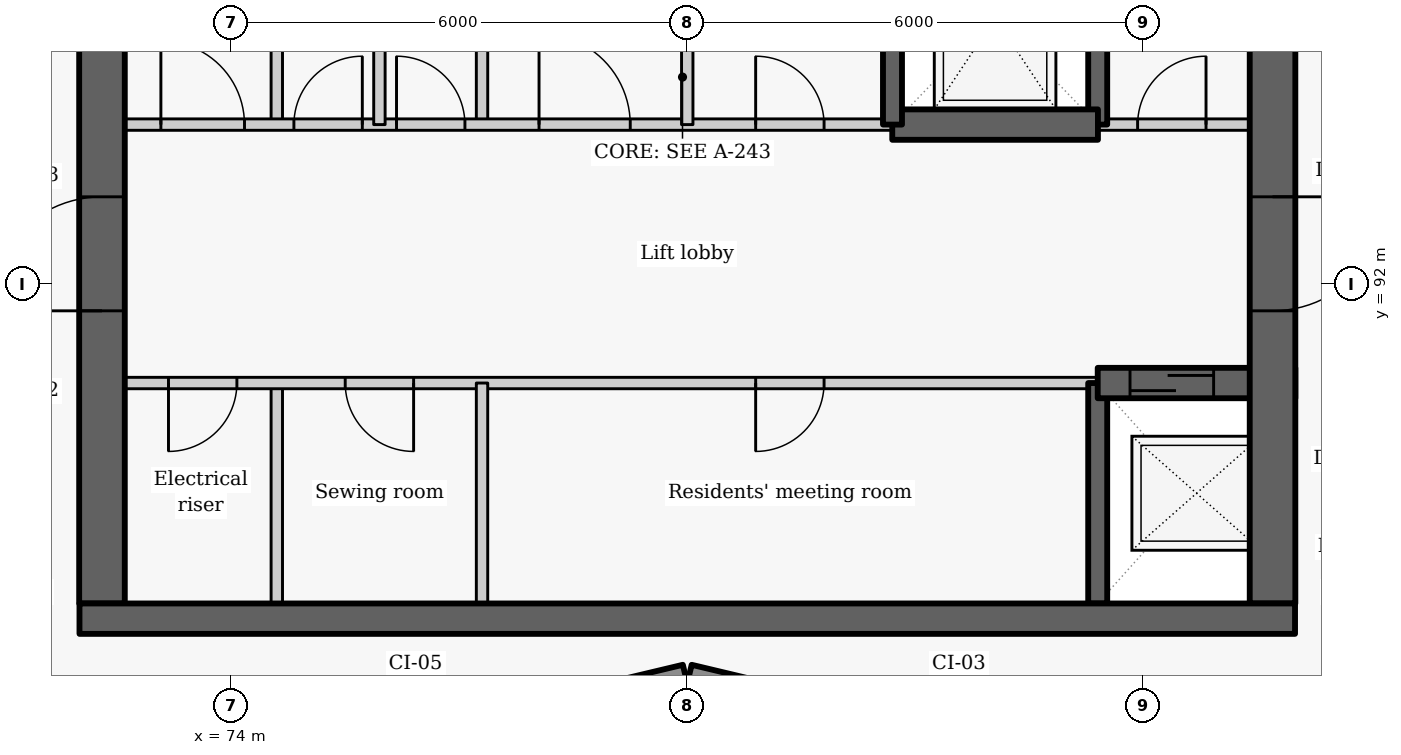
"""IFC4 building model, lengths in metres.
Left out: names, types, materials, properties, quantities, classifications, styles, units other than length and angle.
Written with IfcOpenShell. Run it as: python <this file> out.ifc"""

import sys

from ifc_helpers import new_model, si_unit, direction, frame, frame_2d, origin, place, context, subcontext, project, spatial, rectangle, extrude, element, fill, save


model = new_model("IFC4")
c1 = context("Model", 3, precision=1e-05, world=origin(), true_north=direction((0.0, 1.0)))
c2 = subcontext(c1, "Body", "Model", "MODEL_VIEW")
j1 = project(units=[si_unit("LENGTHUNIT", "METRE"), si_unit("PLANEANGLEUNIT", "RADIAN")], contexts=[c1])
p1 = place(None, origin())
s1 = spatial("IfcSite", under=j1, at=p1, CompositionType="ELEMENT")
p2 = place(p1, origin())
s2 = spatial("IfcBuilding", under=s1, at=p2, CompositionType="ELEMENT")
p3 = place(p2, frame((0.0, 0.0, 259.2)))
s3 = spatial("IfcBuildingStorey", under=s2, at=p3, CompositionType="ELEMENT", Elevation=259.2)
for number, where, z_axis, x_axis in (
    (1, (76.814, 86.119, 0.0), (0.0, 0.0, 1.0), (0.973, 0.232, 0.0)),
    (2, (80.029, 86.872, 0.0), (0.0, 0.0, 1.0), (0.973, -0.232, 0.0)),
):
    element("IfcWall", number, at=place(p3, frame(where, z_axis=z_axis, x_axis=x_axis)), inside=s3, PredefinedType="SOLIDWALL", context=c2, shape_type="SweptSolid", body=[
        extrude(rectangle(XDim=3.246, YDim=0.25, at=frame_2d((1.623, 0.0))), origin(), (0.0, 0.0, 1.0), 2.425),
    ])
p4 = place(p3, frame((74.6, 87.8, 0.0), z_axis=(0.0, 0.0, 1.0), x_axis=(0.0, 1.0, 0.0)))
e3 = element("IfcWall", 3, at=p4, inside=s3, PredefinedType="PARTITIONING", context=c2, shape_type="SweptSolid", body=[
    extrude(rectangle(XDim=2.9, YDim=0.15, at=frame_2d((1.45, 0.0))), origin(), (0.0, 0.0, 1.0), 3.025),
])
p5 = place(p3, frame((74.6, 94.1, 0.0), z_axis=(0.0, 0.0, 1.0), x_axis=(0.0, 1.0, 0.0)))
e4 = element("IfcWall", 4, at=p5, inside=s3, PredefinedType="PARTITIONING", context=c2, shape_type="SweptSolid", body=[
    extrude(rectangle(XDim=2.8, YDim=0.15, at=frame_2d((1.4, 0.0))), origin(), (0.0, 0.0, 1.0), 3.025),
])
p6 = place(p3, frame((85.4, 90.7, 0.0), z_axis=(0.0, 0.0, 1.0), x_axis=(-1.0, 0.0, 0.0)))
e5 = element("IfcWall", 5, at=p6, inside=s3, PredefinedType="PARTITIONING", context=c2, shape_type="SweptSolid", body=[
    extrude(rectangle(XDim=13.4, YDim=0.15, at=frame_2d((6.7, 0.0))), origin(), (0.0, 0.0, 1.0), 3.025),
])
p7 = place(p6, frame((11.325, 0.0, 0.0)))
e6 = element("IfcOpeningElement", 6, at=p7, cuts=e5, PredefinedType="OPENING", context=c2, shape_type="SweptSolid", body=[
    extrude(rectangle(XDim=0.9, YDim=2.1, at=frame_2d((0.45, 1.05))), frame((0.0, 0.085, 0.0), z_axis=(0.0, -1.0, 0.0), x_axis=(1.0, 0.0, 0.0)), (0.0, 0.0, 1.0), 0.17),
])
p8 = place(p6, frame((9.0, 0.0, 0.0)))
e7 = element("IfcOpeningElement", 7, at=p8, cuts=e5, PredefinedType="OPENING", context=c2, shape_type="SweptSolid", body=[
    extrude(rectangle(XDim=0.9, YDim=2.1, at=frame_2d((0.45, 1.05))), frame((0.0, 0.085, 0.0), z_axis=(0.0, -1.0, 0.0), x_axis=(1.0, 0.0, 0.0)), (0.0, 0.0, 1.0), 0.17),
])
p9 = place(p6, frame((3.6, 0.0, 0.0)))
e8 = element("IfcOpeningElement", 8, at=p9, cuts=e5, PredefinedType="OPENING", context=c2, shape_type="SweptSolid", body=[
    extrude(rectangle(XDim=0.9, YDim=2.1, at=frame_2d((0.45, 1.05))), frame((0.0, 0.085, 0.0), z_axis=(0.0, -1.0, 0.0), x_axis=(1.0, 0.0, 0.0)), (0.0, 0.0, 1.0), 0.17),
])
p10 = place(p3, frame((72.3, 87.8, -0.275), z_axis=(0.0, 0.0, 1.0), x_axis=(0.0, 1.0, 0.0)))
e9 = element("IfcWall", 9, at=p10, inside=s3, PredefinedType="SHEAR", context=c2, shape_type="SweptSolid", body=[
    extrude(rectangle(XDim=9.1, YDim=0.6, at=frame_2d((4.55, 0.0))), origin(), (0.0, 0.0, 1.0), 3.3),
])
p11 = place(p10, frame((3.85, 0.0, 0.275)))
e10 = element("IfcOpeningElement", 10, at=p11, cuts=e9, PredefinedType="OPENING", context=c2, shape_type="SweptSolid", body=[
    extrude(rectangle(XDim=1.5, YDim=2.1, at=frame_2d((0.75, 1.05))), frame((0.0, 0.31, 0.0), z_axis=(0.0, -1.0, 0.0), x_axis=(1.0, 0.0, 0.0)), (0.0, 0.0, 1.0), 0.62),
])
p12 = place(p3, frame((85.4, 87.8, -0.275), z_axis=(0.0, 0.0, 1.0), x_axis=(0.0, 1.0, 0.0)))
e11 = element("IfcWall", 11, at=p12, inside=s3, PredefinedType="SHEAR", context=c2, shape_type="SweptSolid", body=[
    extrude(rectangle(XDim=2.9, YDim=0.25, at=frame_2d((1.45, 0.0))), origin(), (0.0, 0.0, 1.0), 3.3),
])
p13 = place(p3, frame((85.4, 94.1, -0.275), z_axis=(0.0, 0.0, 1.0), x_axis=(0.0, 1.0, 0.0)))
e12 = element("IfcWall", 12, at=p13, inside=s3, PredefinedType="SHEAR", context=c2, shape_type="SweptSolid", body=[
    extrude(rectangle(XDim=2.8, YDim=0.25, at=frame_2d((1.4, 0.0))), origin(), (0.0, 0.0, 1.0), 3.3),
])
p14 = place(p3, frame((85.4, 90.7, -0.275), z_axis=(0.0, 0.0, 1.0), x_axis=(1.0, 0.0, 0.0)))
e13 = element("IfcWall", 13, at=p14, inside=s3, PredefinedType="SHEAR", context=c2, shape_type="SweptSolid", body=[
    extrude(rectangle(XDim=2.6, YDim=0.4, at=frame_2d((1.3, 0.0))), origin(), (0.0, 0.0, 1.0), 3.3),
])
p15 = place(p14, frame((0.425, 0.0, 0.275)))
e14 = element("IfcOpeningElement", 14, at=p15, cuts=e13, PredefinedType="OPENING", context=c2, shape_type="SweptSolid", body=[
    extrude(rectangle(XDim=1.1, YDim=2.1, at=frame_2d((0.55, 1.05))), frame((0.0, 0.21, 0.0), z_axis=(0.0, -1.0, 0.0), x_axis=(1.0, 0.0, 0.0)), (0.0, 0.0, 1.0), 0.42),
])
p16 = place(p3, frame((87.7, 102.05, -0.275), z_axis=(0.0, 0.0, 1.0), x_axis=(0.0, -1.0, 0.0)))
e15 = element("IfcWall", 15, at=p16, inside=s3, PredefinedType="SHEAR", context=c2, shape_type="SweptSolid", body=[
    extrude(rectangle(XDim=14.25, YDim=0.6, at=frame_2d((7.125, 0.0))), origin(), (0.0, 0.0, 1.0), 3.3),
])
p17 = place(p16, frame((8.9, 0.0, 0.275)))
e16 = element("IfcOpeningElement", 16, at=p17, cuts=e15, PredefinedType="OPENING", context=c2, shape_type="SweptSolid", body=[
    extrude(rectangle(XDim=1.5, YDim=2.1, at=frame_2d((0.75, 1.05))), frame((0.0, 0.31, 0.0), z_axis=(0.0, -1.0, 0.0), x_axis=(1.0, 0.0, 0.0)), (0.0, 0.0, 1.0), 0.62),
])
p18 = place(p16, frame((2.025, 0.0, 0.275)))
e17 = element("IfcOpeningElement", 17, at=p18, cuts=e15, PredefinedType="OPENING", context=c2, shape_type="SweptSolid", body=[
    extrude(rectangle(XDim=1.1, YDim=2.1, at=frame_2d((0.55, 1.05))), frame((0.0, 0.31, 0.0), z_axis=(0.0, -1.0, 0.0), x_axis=(1.0, 0.0, 0.0)), (0.0, 0.0, 1.0), 0.62),
])
p19 = place(p3, frame((77.3, 87.8, 0.0), z_axis=(0.0, 0.0, 1.0), x_axis=(0.0, 1.0, 0.0)))
e18 = element("IfcWall", 18, at=p19, inside=s3, PredefinedType="PARTITIONING", context=c2, shape_type="SweptSolid", body=[
    extrude(rectangle(XDim=2.9, YDim=0.15, at=frame_2d((1.45, 0.0))), origin(), (0.0, 0.0, 1.0), 3.025),
])
p20 = place(p3, frame((77.3, 94.1, 0.0), z_axis=(0.0, 0.0, 1.0), x_axis=(0.0, 1.0, 0.0)))
e19 = element("IfcWall", 19, at=p20, inside=s3, PredefinedType="PARTITIONING", context=c2, shape_type="SweptSolid", body=[
    extrude(rectangle(XDim=2.8, YDim=0.15, at=frame_2d((1.4, 0.0))), origin(), (0.0, 0.0, 1.0), 3.025),
])
p21 = place(p3, frame((72.0, 94.1, 0.0), z_axis=(0.0, 0.0, 1.0), x_axis=(1.0, 0.0, 0.0)))
e20 = element("IfcWall", 20, at=p21, inside=s3, PredefinedType="PARTITIONING", context=c2, shape_type="SweptSolid", body=[
    extrude(rectangle(XDim=10.703, YDim=0.15, at=frame_2d((5.352, 0.0))), origin(), (0.0, 0.0, 1.0), 3.025),
])
p22 = place(p21, frame((1.075, 0.0, 0.0)))
e21 = element("IfcOpeningElement", 21, at=p22, cuts=e20, PredefinedType="OPENING", context=c2, shape_type="SweptSolid", body=[
    extrude(rectangle(XDim=1.1, YDim=2.1, at=frame_2d((0.55, 1.05))), frame((0.0, 0.085, 0.0), z_axis=(0.0, -1.0, 0.0), x_axis=(1.0, 0.0, 0.0)), (0.0, 0.0, 1.0), 0.17),
])
p23 = place(p21, frame((2.825, 0.0, 0.0)))
e22 = element("IfcOpeningElement", 22, at=p23, cuts=e20, PredefinedType="OPENING", context=c2, shape_type="SweptSolid", body=[
    extrude(rectangle(XDim=0.9, YDim=2.1, at=frame_2d((0.45, 1.05))), frame((0.0, 0.085, 0.0), z_axis=(0.0, -1.0, 0.0), x_axis=(1.0, 0.0, 0.0)), (0.0, 0.0, 1.0), 0.17),
])
p24 = place(p21, frame((4.175, 0.0, 0.0)))
e23 = element("IfcOpeningElement", 23, at=p24, cuts=e20, PredefinedType="OPENING", context=c2, shape_type="SweptSolid", body=[
    extrude(rectangle(XDim=0.9, YDim=2.1, at=frame_2d((0.45, 1.05))), frame((0.0, 0.085, 0.0), z_axis=(0.0, -1.0, 0.0), x_axis=(1.0, 0.0, 0.0)), (0.0, 0.0, 1.0), 0.17),
])
p25 = place(p21, frame((6.05, 0.0, 0.0)))
e24 = element("IfcOpeningElement", 24, at=p25, cuts=e20, PredefinedType="OPENING", context=c2, shape_type="SweptSolid", body=[
    extrude(rectangle(XDim=1.2, YDim=2.1, at=frame_2d((0.6, 1.05))), frame((0.0, 0.085, 0.0), z_axis=(0.0, -1.0, 0.0), x_axis=(1.0, 0.0, 0.0)), (0.0, 0.0, 1.0), 0.17),
])
p26 = place(p21, frame((8.9, 0.0, 0.0)))
e25 = element("IfcOpeningElement", 25, at=p26, cuts=e20, PredefinedType="OPENING", context=c2, shape_type="SweptSolid", body=[
    extrude(rectangle(XDim=0.9, YDim=2.1, at=frame_2d((0.45, 1.05))), frame((0.0, 0.085, 0.0), z_axis=(0.0, -1.0, 0.0), x_axis=(1.0, 0.0, 0.0)), (0.0, 0.0, 1.0), 0.17),
])
p27 = place(p3, frame((85.397, 94.1, 0.0), z_axis=(0.0, 0.0, 1.0), x_axis=(1.0, 0.0, 0.0)))
e26 = element("IfcWall", 26, at=p27, inside=s3, PredefinedType="PARTITIONING", context=c2, shape_type="SweptSolid", body=[
    extrude(rectangle(XDim=2.603, YDim=0.15, at=frame_2d((1.302, 0.0))), origin(), (0.0, 0.0, 1.0), 3.025),
])
p28 = place(p27, frame((0.528, 0.0, 0.0)))
e27 = element("IfcOpeningElement", 27, at=p28, cuts=e26, PredefinedType="OPENING", context=c2, shape_type="SweptSolid", body=[
    extrude(rectangle(XDim=0.9, YDim=2.1, at=frame_2d((0.45, 1.05))), frame((0.0, 0.085, 0.0), z_axis=(0.0, -1.0, 0.0), x_axis=(1.0, 0.0, 0.0)), (0.0, 0.0, 1.0), 0.17),
])
p29 = place(p3, frame((82.697, 94.1, -0.275), z_axis=(0.0, 0.0, 1.0), x_axis=(1.0, 0.0, 0.0)))
e28 = element("IfcWall", 28, at=p29, inside=s3, PredefinedType="SHEAR", context=c2, shape_type="SweptSolid", body=[
    extrude(rectangle(XDim=2.706, YDim=0.4, at=frame_2d((1.353, 0.0))), origin(), (0.0, 0.0, 1.0), 3.3),
])
for number, where, z_axis, x_axis in (
    (29, (75.95, 94.1, 0.0), (0.0, 0.0, 1.0), (0.0, 1.0, 0.0)),
    (30, (80.0, 94.1, 0.0), (0.0, 0.0, 1.0), (0.0, 1.0, 0.0)),
):
    element("IfcWall", number, at=place(p3, frame(where, z_axis=z_axis, x_axis=x_axis)), inside=s3, PredefinedType="PARTITIONING", context=c2, shape_type="SweptSolid", body=[
        extrude(rectangle(XDim=2.8, YDim=0.15, at=frame_2d((1.4, 0.0))), origin(), (0.0, 0.0, 1.0), 3.025),
    ])
p30 = place(p3, frame((82.7, 94.1, -0.275), z_axis=(0.0, 0.0, 1.0), x_axis=(0.0, 1.0, 0.0)))
e31 = element("IfcWall", 31, at=p30, inside=s3, PredefinedType="SHEAR", context=c2, shape_type="SweptSolid", body=[
    extrude(rectangle(XDim=2.8, YDim=0.25, at=frame_2d((1.4, 0.0))), origin(), (0.0, 0.0, 1.0), 3.3),
])
p31 = place(p3, frame((72.004, 87.6, -0.275), z_axis=(0.0, 0.0, 1.0), x_axis=(1.0, 0.0, 0.0)))
e32 = element("IfcWall", 32, at=p31, inside=s3, PredefinedType="SHEAR", context=c2, shape_type="SweptSolid", body=[
    extrude(rectangle(XDim=15.992, YDim=0.4, at=frame_2d((7.996, 0.0))), origin(), (0.0, 0.0, 1.0), 3.3),
])
p32 = place(p7, origin())
e33 = element("IfcDoor", 33, at=p32, inside=s3, OperationType="SINGLE_SWING_RIGHT", PredefinedType="DOOR", context=c2, shape_type="SweptSolid", body=[
    extrude(rectangle(XDim=0.9, YDim=2.1, at=frame_2d((0.45, 1.05))), frame((0.0, 0.025, 0.0), z_axis=(0.0, -1.0, 0.0), x_axis=(1.0, 0.0, 0.0)), (0.0, 0.0, 1.0), 0.05),
])
fill(e6, e33)
p33 = place(p15, origin())
e34 = element("IfcDoor", 34, at=p33, inside=s3, OperationType="SLIDING_TO_LEFT", PredefinedType="DOOR", context=c2, shape_type="SweptSolid", body=[
    extrude(rectangle(XDim=1.1, YDim=2.1, at=frame_2d((0.55, 1.05))), frame((0.0, 0.025, 0.0), z_axis=(0.0, -1.0, 0.0), x_axis=(1.0, 0.0, 0.0)), (0.0, 0.0, 1.0), 0.05),
])
fill(e14, e34)
p34 = place(p8, origin())
e35 = element("IfcDoor", 35, at=p34, inside=s3, OperationType="SINGLE_SWING_LEFT", PredefinedType="DOOR", context=c2, shape_type="SweptSolid", body=[
    extrude(rectangle(XDim=0.9, YDim=2.1, at=frame_2d((0.45, 1.05))), frame((0.0, 0.025, 0.0), z_axis=(0.0, -1.0, 0.0), x_axis=(1.0, 0.0, 0.0)), (0.0, 0.0, 1.0), 0.05),
])
fill(e7, e35)
p35 = place(p9, origin())
e36 = element("IfcDoor", 36, at=p35, inside=s3, OperationType="SINGLE_SWING_RIGHT", PredefinedType="DOOR", context=c2, shape_type="SweptSolid", body=[
    extrude(rectangle(XDim=0.9, YDim=2.1, at=frame_2d((0.45, 1.05))), frame((0.0, 0.025, 0.0), z_axis=(0.0, -1.0, 0.0), x_axis=(1.0, 0.0, 0.0)), (0.0, 0.0, 1.0), 0.05),
])
fill(e8, e36)
p36 = place(p22, origin())
e37 = element("IfcDoor", 37, at=p36, inside=s3, OperationType="SINGLE_SWING_LEFT", PredefinedType="DOOR", context=c2, shape_type="SweptSolid", body=[
    extrude(rectangle(XDim=1.1, YDim=2.1, at=frame_2d((0.55, 1.05))), frame((0.0, 0.025, 0.0), z_axis=(0.0, -1.0, 0.0), x_axis=(1.0, 0.0, 0.0)), (0.0, 0.0, 1.0), 0.05),
])
fill(e21, e37)
p37 = place(p23, origin())
e38 = element("IfcDoor", 38, at=p37, inside=s3, OperationType="SINGLE_SWING_RIGHT", PredefinedType="DOOR", context=c2, shape_type="SweptSolid", body=[
    extrude(rectangle(XDim=0.9, YDim=2.1, at=frame_2d((0.45, 1.05))), frame((0.0, 0.025, 0.0), z_axis=(0.0, -1.0, 0.0), x_axis=(1.0, 0.0, 0.0)), (0.0, 0.0, 1.0), 0.05),
])
fill(e22, e38)
p38 = place(p24, origin())
e39 = element("IfcDoor", 39, at=p38, inside=s3, OperationType="SINGLE_SWING_LEFT", PredefinedType="DOOR", context=c2, shape_type="SweptSolid", body=[
    extrude(rectangle(XDim=0.9, YDim=2.1, at=frame_2d((0.45, 1.05))), frame((0.0, 0.025, 0.0), z_axis=(0.0, -1.0, 0.0), x_axis=(1.0, 0.0, 0.0)), (0.0, 0.0, 1.0), 0.05),
])
fill(e23, e39)
p39 = place(p25, origin())
e40 = element("IfcDoor", 40, at=p39, inside=s3, OperationType="DOUBLE_DOOR_SINGLE_SWING", PredefinedType="DOOR", context=c2, shape_type="SweptSolid", body=[
    extrude(rectangle(XDim=1.2, YDim=2.1, at=frame_2d((0.6, 1.05))), frame((0.0, 0.025, 0.0), z_axis=(0.0, -1.0, 0.0), x_axis=(1.0, 0.0, 0.0)), (0.0, 0.0, 1.0), 0.05),
])
fill(e24, e40)
p40 = place(p26, origin())
e41 = element("IfcDoor", 41, at=p40, inside=s3, OperationType="SINGLE_SWING_LEFT", PredefinedType="DOOR", context=c2, shape_type="SweptSolid", body=[
    extrude(rectangle(XDim=0.9, YDim=2.1, at=frame_2d((0.45, 1.05))), frame((0.0, 0.025, 0.0), z_axis=(0.0, -1.0, 0.0), x_axis=(1.0, 0.0, 0.0)), (0.0, 0.0, 1.0), 0.05),
])
fill(e25, e41)
p41 = place(p28, origin())
e42 = element("IfcDoor", 42, at=p41, inside=s3, OperationType="SINGLE_SWING_RIGHT", PredefinedType="DOOR", context=c2, shape_type="SweptSolid", body=[
    extrude(rectangle(XDim=0.9, YDim=2.1, at=frame_2d((0.45, 1.05))), frame((0.0, 0.025, 0.0), z_axis=(0.0, -1.0, 0.0), x_axis=(1.0, 0.0, 0.0)), (0.0, 0.0, 1.0), 0.05),
])
fill(e27, e42)
p42 = place(p17, origin())
e43 = element("IfcDoor", 43, at=p42, inside=s3, OperationType="DOUBLE_DOOR_SINGLE_SWING", PredefinedType="DOOR", context=c2, shape_type="SweptSolid", body=[
    extrude(rectangle(XDim=1.5, YDim=2.1, at=frame_2d((0.75, 1.05))), frame((0.0, 0.025, 0.0), z_axis=(0.0, -1.0, 0.0), x_axis=(1.0, 0.0, 0.0)), (0.0, 0.0, 1.0), 0.05),
])
fill(e16, e43)
p43 = place(p11, origin())
e44 = element("IfcDoor", 44, at=p43, inside=s3, OperationType="DOUBLE_DOOR_SINGLE_SWING", PredefinedType="DOOR", context=c2, shape_type="SweptSolid", body=[
    extrude(rectangle(XDim=1.5, YDim=2.1, at=frame_2d((0.75, 1.05))), frame((0.0, 0.025, 0.0), z_axis=(0.0, -1.0, 0.0), x_axis=(1.0, 0.0, 0.0)), (0.0, 0.0, 1.0), 0.05),
])
fill(e10, e44)
save(model, sys.argv[1])
